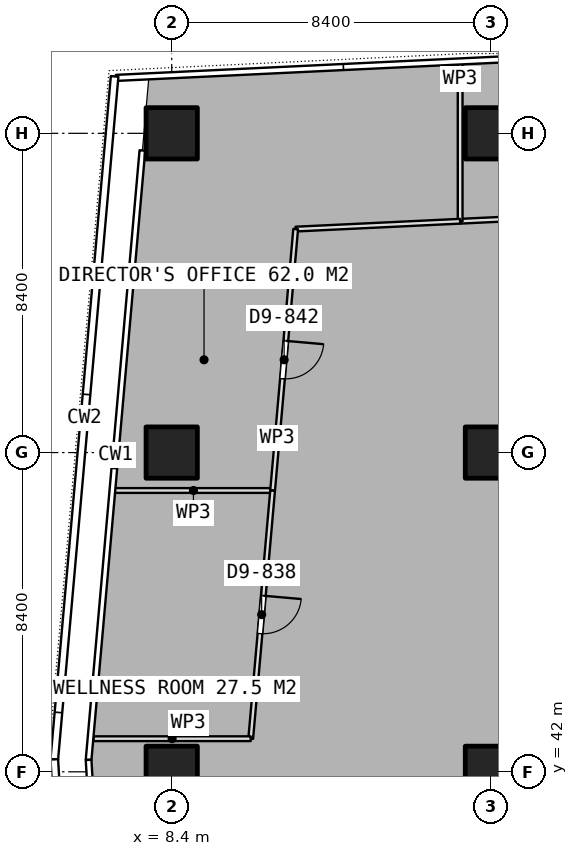
"""IFC4 building model, lengths in metres.
Left out: names, types, materials, properties, quantities, classifications, styles, units other than length and angle.
Written with IfcOpenShell. Run it as: python <this file> out.ifc"""

import sys

from ifc_helpers import new_model, si_unit, direction, frame, frame_2d, origin, origin_2d, place, context, subcontext, project, spatial, rectangle, extrude, element, fill, save


model = new_model("IFC4")
c1 = context("Model", 3, precision=1e-05, world=origin(), true_north=direction((0.0, 1.0)))
c2 = subcontext(c1, "Body", "Model", "MODEL_VIEW")
j1 = project(units=[si_unit("LENGTHUNIT", "METRE"), si_unit("PLANEANGLEUNIT", "RADIAN")], contexts=[c1])
p1 = place(None, origin())
s1 = spatial("IfcSite", under=j1, at=p1, CompositionType="ELEMENT")
p2 = place(p1, origin())
s2 = spatial("IfcBuilding", under=s1, at=p2, CompositionType="ELEMENT")
p3 = place(p2, frame((0.0, 0.0, 206.45)))
s3 = spatial("IfcBuildingStorey", under=s2, at=p3, CompositionType="ELEMENT", Elevation=206.45)
for number, where, z_axis, x_axis in (
    (1, (8.4, 42.0, 0.0), (0.0, 0.0, 1.0), (1.0, 0.0, 0.0)),
    (2, (8.4, 50.4, 0.0), (0.0, 0.0, 1.0), (1.0, 0.0, 0.0)),
    (3, (8.4, 58.8, 0.0), (0.0, 0.0, 1.0), (1.0, 0.0, 0.0)),
    (4, (16.8, 42.0, 0.0), (0.0, 0.0, 1.0), (1.0, 0.0, 0.0)),
    (5, (16.8, 50.4, 0.0), (0.0, 0.0, 1.0), (1.0, 0.0, 0.0)),
    (6, (16.8, 58.8, 0.0), (0.0, 0.0, 1.0), (1.0, 0.0, 0.0)),
):
    element("IfcColumn", number, at=place(p3, frame(where, z_axis=z_axis, x_axis=x_axis)), inside=s3, PredefinedType="COLUMN", context=c2, shape_type="SweptSolid", body=[
        extrude(rectangle(XDim=1.35, YDim=1.35, at=origin_2d()), origin(), (0.0, 0.0, 1.0), 3.75),
    ])
p4 = place(p3, frame((25.197, 56.927, 0.0), z_axis=(0.0, 0.0, 1.0), x_axis=(-0.99886033417, -0.047728742103, 0.0)))
e7 = element("IfcWall", 7, at=p4, inside=s3, PredefinedType="PARTITIONING", context=c2, shape_type="SweptSolid", body=[
    extrude(rectangle(XDim=9.218, YDim=0.125, at=frame_2d((4.609, 0.0))), origin(), (0.0, 0.0, 1.0), 3.5),
])
p5 = place(p4, frame((4.109, 0.0, 0.0)))
e8 = element("IfcOpeningElement", 8, at=p5, cuts=e7, PredefinedType="OPENING", context=c2, shape_type="SweptSolid", body=[
    extrude(rectangle(XDim=1.0, YDim=2.1, at=frame_2d((0.5, 1.05))), frame((0.0, 0.073, 0.0), z_axis=(0.0, -1.0, 0.0), x_axis=(1.0, 0.0, 0.0)), (0.0, 0.0, 1.0), 0.145),
])
p6 = place(p3, frame((15.99, 56.487, 0.0), z_axis=(0.0, 0.0, 1.0), x_axis=(0.0, 1.0, 0.0)))
e9 = element("IfcWall", 9, at=p6, inside=s3, PredefinedType="PARTITIONING", context=c2, shape_type="SweptSolid", body=[
    extrude(rectangle(XDim=4.155, YDim=0.125, at=frame_2d((2.078, 0.0))), origin(), (0.0, 0.0, 1.0), 3.5),
])
p7 = place(p3, frame((11.055, 49.402, 0.0), z_axis=(0.0, 0.0, 1.0), x_axis=(-1.0, 0.0, 0.0)))
e10 = element("IfcWall", 10, at=p7, inside=s3, PredefinedType="PARTITIONING", context=c2, shape_type="SweptSolid", body=[
    extrude(rectangle(XDim=4.166, YDim=0.125, at=frame_2d((2.083, 0.0))), origin(), (0.0, 0.0, 1.0), 3.5),
])
p8 = place(p3, frame((15.989, 56.487, 0.0), z_axis=(0.0, 0.0, 1.0), x_axis=(-0.998857273451, -0.047792753365, 0.0)))
e11 = element("IfcWall", 11, at=p8, inside=s3, PredefinedType="PARTITIONING", context=c2, shape_type="SweptSolid", body=[
    extrude(rectangle(XDim=4.332, YDim=0.125, at=frame_2d((2.166, 0.0))), origin(), (0.0, 0.0, 1.0), 3.5),
])
p9 = place(p3, frame((11.662, 56.28, 0.0), z_axis=(0.0, 0.0, 1.0), x_axis=(-0.087937151209, -0.996126024877, 0.0)))
e12 = element("IfcWall", 12, at=p9, inside=s3, PredefinedType="PARTITIONING", context=c2, shape_type="SweptSolid", body=[
    extrude(rectangle(XDim=6.905, YDim=0.125, at=frame_2d((3.452, 0.0))), origin(), (0.0, 0.0, 1.0), 3.5),
])
p10 = place(p9, frame((2.952, 0.0, 0.0)))
e13 = element("IfcOpeningElement", 13, at=p10, cuts=e12, PredefinedType="OPENING", context=c2, shape_type="SweptSolid", body=[
    extrude(rectangle(XDim=1.0, YDim=2.1, at=frame_2d((0.5, 1.05))), frame((0.0, 0.073, 0.0), z_axis=(0.0, -1.0, 0.0), x_axis=(1.0, 0.0, 0.0)), (0.0, 0.0, 1.0), 0.145),
])
p11 = place(p3, frame((11.055, 49.401, 0.0), z_axis=(0.0, 0.0, 1.0), x_axis=(-0.087859027692, -0.996132918467, 0.0)))
e14 = element("IfcWall", 14, at=p11, inside=s3, PredefinedType="PARTITIONING", context=c2, shape_type="SweptSolid", body=[
    extrude(rectangle(XDim=6.555, YDim=0.125, at=frame_2d((3.278, 0.0))), origin(), (0.0, 0.0, 1.0), 3.5),
])
p12 = place(p11, frame((2.778, 0.0, 0.0)))
e15 = element("IfcOpeningElement", 15, at=p12, cuts=e14, PredefinedType="OPENING", context=c2, shape_type="SweptSolid", body=[
    extrude(rectangle(XDim=1.0, YDim=2.1, at=frame_2d((0.5, 1.05))), frame((0.0, 0.073, 0.0), z_axis=(0.0, -1.0, 0.0), x_axis=(1.0, 0.0, 0.0)), (0.0, 0.0, 1.0), 0.145),
])
p13 = place(p3, frame((10.479, 42.871, 0.0), z_axis=(0.0, 0.0, 1.0), x_axis=(-1.0, 0.0, 0.0)))
e16 = element("IfcWall", 16, at=p13, inside=s3, PredefinedType="PARTITIONING", context=c2, shape_type="SweptSolid", body=[
    extrude(rectangle(XDim=4.137, YDim=0.125, at=frame_2d((2.068, 0.0))), origin(), (0.0, 0.0, 1.0), 3.5),
])
p14 = place(p10, origin())
e17 = element("IfcDoor", 17, at=p14, inside=s3, OperationType="SINGLE_SWING_LEFT", PredefinedType="DOOR", context=c2, shape_type="SweptSolid", body=[
    extrude(rectangle(XDim=1.0, YDim=2.1, at=frame_2d((0.5, 1.05))), frame((0.0, 0.025, 0.0), z_axis=(0.0, -1.0, 0.0), x_axis=(1.0, 0.0, 0.0)), (0.0, 0.0, 1.0), 0.05),
])
fill(e13, e17)
p15 = place(p12, origin())
e18 = element("IfcDoor", 18, at=p15, inside=s3, OperationType="SINGLE_SWING_LEFT", PredefinedType="DOOR", context=c2, shape_type="SweptSolid", body=[
    extrude(rectangle(XDim=1.0, YDim=2.1, at=frame_2d((0.5, 1.05))), frame((0.0, 0.025, 0.0), z_axis=(0.0, -1.0, 0.0), x_axis=(1.0, 0.0, 0.0)), (0.0, 0.0, 1.0), 0.05),
])
fill(e15, e18)
save(model, sys.argv[1])
